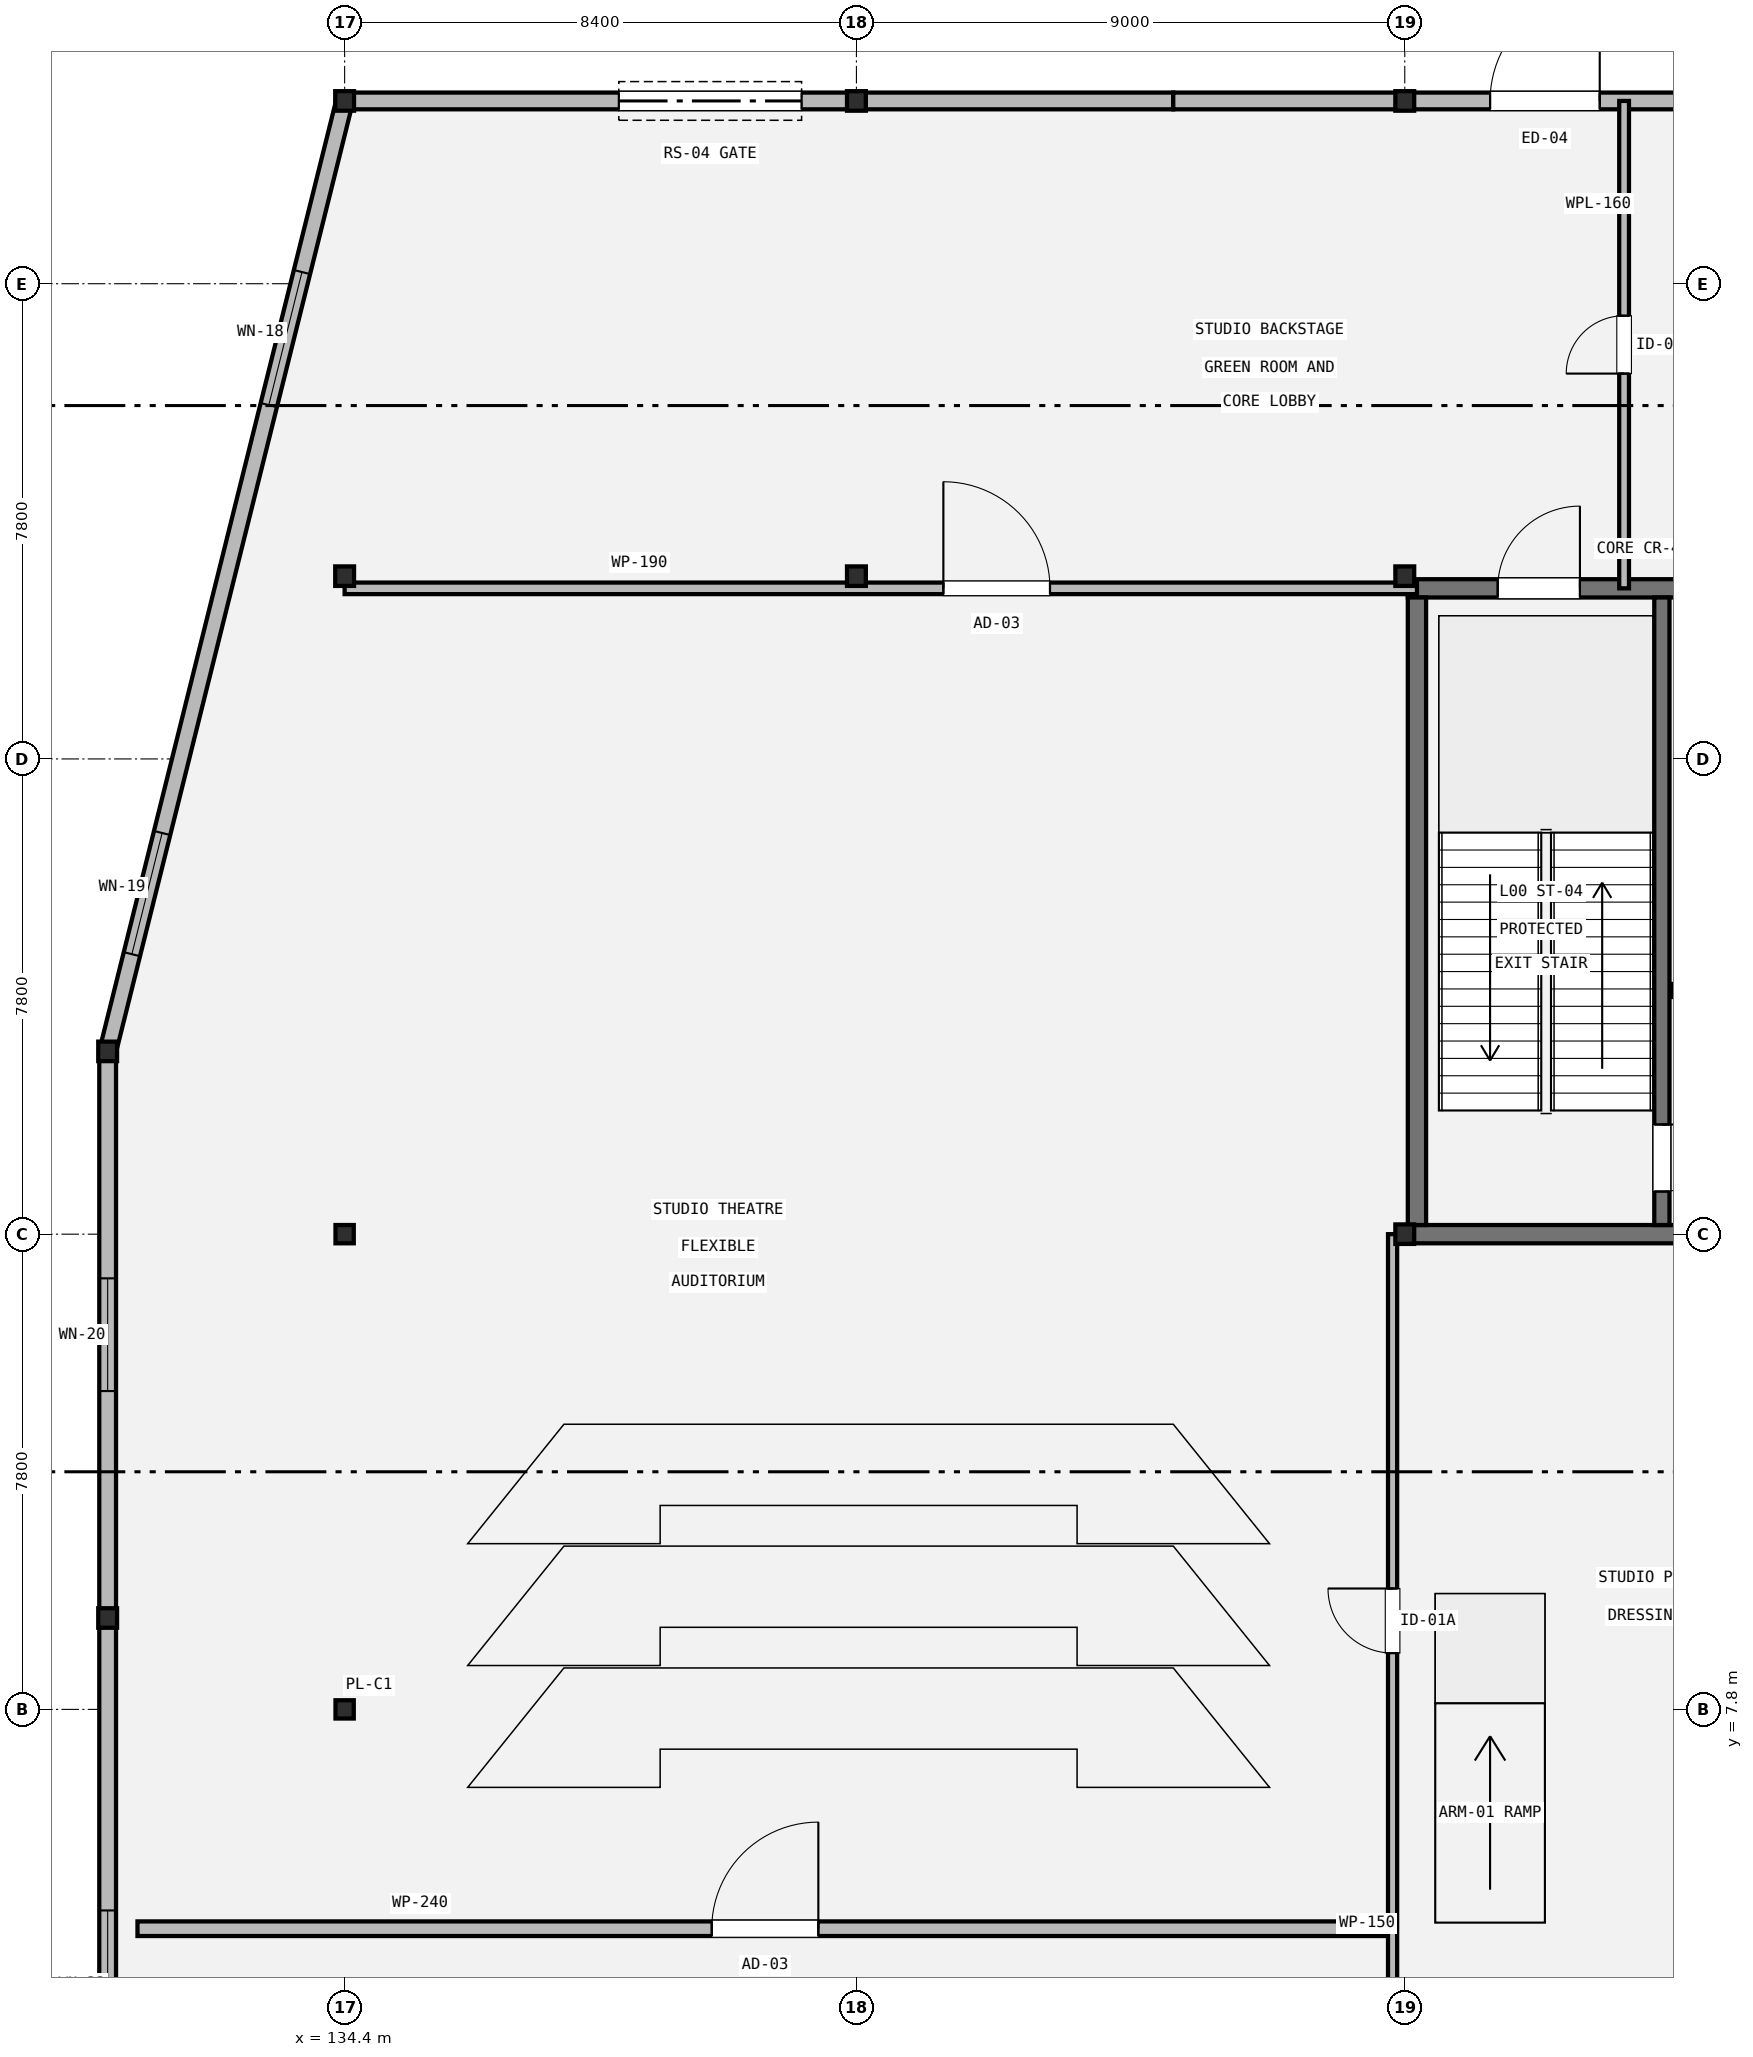
"""IFC4 building model, lengths in metres.
Left out: names, types, materials, properties, quantities, classifications, styles, units other than length and angle.
Written with IfcOpenShell. Run it as: python <this file> out.ifc"""

import sys

from ifc_helpers import new_model, si_unit, direction, frame, frame_2d, origin, origin_2d, place, context, subcontext, project, spatial, rectangle, hollow_rectangle, i_section, extrude, element, fill, save


model = new_model("IFC4")
c1 = context("Model", 3, precision=1e-05, world=origin(), true_north=direction((0.0, 1.0)))
c2 = subcontext(c1, "Body", "Model", "MODEL_VIEW")
j1 = project(units=[si_unit("LENGTHUNIT", "METRE"), si_unit("PLANEANGLEUNIT", "RADIAN")], contexts=[c1])
p1 = place(None, origin())
s1 = spatial("IfcSite", under=j1, at=p1, CompositionType="ELEMENT")
p2 = place(p1, origin())
s2 = spatial("IfcBuilding", under=s1, at=p2, CompositionType="ELEMENT")
p3 = place(p2, origin())
s3 = spatial("IfcBuildingStorey", under=s2, at=p3, CompositionType="ELEMENT", Elevation=0.0)
for number, where, z_axis, x_axis in (
    (1, (130.51, 9.3, 0.0), (0.0, 0.0, 1.0), (1.0, 0.0, 0.0)),
    (2, (130.51, 18.6, 0.0), (0.0, 0.0, 1.0), (1.0, 0.0, 0.0)),
    (3, (134.4, 26.4, 0.0), (0.0, 0.0, 1.0), (1.0, 0.0, 0.0)),
    (4, (134.4, 34.2, 0.0), (0.0, 0.0, 1.0), (1.0, 0.0, 0.0)),
    (5, (142.8, 26.4, 0.0), (0.0, 0.0, 1.0), (1.0, 0.0, 0.0)),
    (6, (142.8, 34.2, 0.0), (0.0, 0.0, 1.0), (1.0, 0.0, 0.0)),
    (7, (151.8, 15.6, 0.0), (0.0, 0.0, 1.0), (1.0, 0.0, 0.0)),
    (8, (151.8, 26.4, 0.0), (0.0, 0.0, 1.0), (1.0, 0.0, 0.0)),
    (9, (151.8, 34.2, 0.0), (0.0, 0.0, 1.0), (1.0, 0.0, 0.0)),
):
    element("IfcColumn", number, at=place(p3, frame(where, z_axis=z_axis, x_axis=x_axis)), inside=s3, PredefinedType="COLUMN", context=c2, shape_type="SweptSolid", body=[
        extrude(i_section(OverallWidth=0.309, OverallDepth=0.321, WebThickness=0.014, FlangeThickness=0.022, FilletRadius=0.015, at=origin_2d()), origin(), (0.0, 0.0, 1.0), 5.4),
    ])
for number, where, z_axis, x_axis in (
    (10, (134.4, 7.8, 0.0), (0.0, 0.0, 1.0), (1.0, 0.0, 0.0)),
    (11, (134.4, 15.6, 0.0), (0.0, 0.0, 1.0), (1.0, 0.0, 0.0)),
):
    element("IfcColumn", number, at=place(p3, frame(where, z_axis=z_axis, x_axis=x_axis)), inside=s3, PredefinedType="PILASTER", context=c2, shape_type="SweptSolid", body=[
        extrude(hollow_rectangle(XDim=0.3, YDim=0.3, WallThickness=0.016, at=origin_2d()), origin(), (0.0, 0.0, 1.0), 5.4),
    ])
p4 = place(p3, frame((130.51, 0.0, 0.0), z_axis=(0.0, 0.0, 1.0), x_axis=(0.0, 1.0, 0.0)))
e12 = element("IfcWall", 12, at=p4, inside=s3, PredefinedType="STANDARD", context=c2, shape_type="SweptSolid", body=[
    extrude(rectangle(XDim=18.6, YDim=0.275, at=frame_2d((9.3, 0.0))), origin(), (0.0, 0.0, 1.0), 4.488),
])
p5 = place(p4, frame((2.1, 0.0, 0.9)))
e13 = element("IfcOpeningElement", 13, at=p5, cuts=e12, PredefinedType="OPENING", context=c2, shape_type="SweptSolid", body=[
    extrude(rectangle(XDim=2.4, YDim=1.65, at=frame_2d((1.2, 0.825))), frame((0.0, 0.147, 0.0), z_axis=(0.0, -1.0, 0.0), x_axis=(1.0, 0.0, 0.0)), (0.0, 0.0, 1.0), 0.295),
])
p6 = place(p4, frame((13.025, 0.0, 0.9)))
e14 = element("IfcOpeningElement", 14, at=p6, cuts=e12, PredefinedType="OPENING", context=c2, shape_type="SweptSolid", body=[
    extrude(rectangle(XDim=1.85, YDim=2.1, at=frame_2d((0.925, 1.05))), frame((0.0, 0.147, 0.0), z_axis=(0.0, -1.0, 0.0), x_axis=(1.0, 0.0, 0.0)), (0.0, 0.0, 1.0), 0.295),
])
p7 = place(p3, frame((130.51, 18.6, 0.0), z_axis=(0.0, 0.0, 1.0), x_axis=(0.241917443673, 0.970296836255, 0.0)))
e15 = element("IfcWall", 15, at=p7, inside=s3, PredefinedType="STANDARD", context=c2, shape_type="SweptSolid", body=[
    extrude(rectangle(XDim=16.077, YDim=0.275, at=frame_2d((8.039, 0.0))), origin(), (0.0, 0.0, 1.0), 4.555),
])
p8 = place(p7, frame((1.644, 0.0, 0.9)))
e16 = element("IfcOpeningElement", 16, at=p8, cuts=e15, PredefinedType="OPENING", context=c2, shape_type="SweptSolid", body=[
    extrude(rectangle(XDim=2.05, YDim=2.1, at=frame_2d((1.025, 1.05))), frame((0.0, 0.147, 0.0), z_axis=(0.0, -1.0, 0.0), x_axis=(1.0, 0.0, 0.0)), (0.0, 0.0, 1.0), 0.295),
])
p9 = place(p7, frame((10.933, 0.0, 0.9)))
e17 = element("IfcOpeningElement", 17, at=p9, cuts=e15, PredefinedType="OPENING", context=c2, shape_type="SweptSolid", body=[
    extrude(rectangle(XDim=2.25, YDim=2.1, at=frame_2d((1.125, 1.05))), frame((0.0, 0.147, 0.0), z_axis=(0.0, -1.0, 0.0), x_axis=(1.0, 0.0, 0.0)), (0.0, 0.0, 1.0), 0.295),
])
p10 = place(p3, frame((134.4, 34.2, 0.0), z_axis=(0.0, 0.0, 1.0), x_axis=(1.0, 0.0, 0.0)))
e18 = element("IfcWall", 18, at=p10, inside=s3, PredefinedType="STANDARD", context=c2, shape_type="SweptSolid", body=[
    extrude(rectangle(XDim=13.6, YDim=0.275, at=frame_2d((6.8, 0.0))), origin(), (0.0, 0.0, 1.0), 4.488),
])
p11 = place(p10, frame((4.5, 0.0, 0.0)))
e19 = element("IfcOpeningElement", 19, at=p11, cuts=e18, PredefinedType="OPENING", context=c2, shape_type="SweptSolid", body=[
    extrude(rectangle(XDim=3.0, YDim=3.1, at=frame_2d((1.5, 1.55))), frame((0.0, 0.147, 0.0), z_axis=(0.0, -1.0, 0.0), x_axis=(1.0, 0.0, 0.0)), (0.0, 0.0, 1.0), 0.295),
])
p12 = place(p3, frame((148.0, 34.2, 0.0), z_axis=(0.0, 0.0, 1.0), x_axis=(1.0, 0.0, 0.0)))
e20 = element("IfcWall", 20, at=p12, inside=s3, PredefinedType="STANDARD", context=c2, shape_type="SweptSolid", body=[
    extrude(rectangle(XDim=12.8, YDim=0.275, at=frame_2d((6.4, 0.0))), origin(), (0.0, 0.0, 1.0), 4.488),
])
p13 = place(p12, frame((5.2, 0.0, 0.0)))
e21 = element("IfcOpeningElement", 21, at=p13, cuts=e20, PredefinedType="OPENING", context=c2, shape_type="SweptSolid", body=[
    extrude(rectangle(XDim=1.8, YDim=2.4, at=frame_2d((0.9, 1.2))), frame((0.0, 0.147, 0.0), z_axis=(0.0, -1.0, 0.0), x_axis=(1.0, 0.0, 0.0)), (0.0, 0.0, 1.0), 0.295),
])
p14 = place(p3, frame((160.8, 15.6, 0.0), z_axis=(0.0, 0.0, 1.0), x_axis=(-1.0, 0.0, 0.0)))
e22 = element("IfcWall", 22, at=p14, inside=s3, PredefinedType="SHEAR", context=c2, shape_type="SweptSolid", body=[
    extrude(rectangle(XDim=8.95, YDim=0.3, at=frame_2d((4.475, 0.0))), origin(), (0.0, 0.0, 1.0), 5.18),
])
p15 = place(p3, frame((151.85, 26.2, 0.0), z_axis=(0.0, 0.0, 1.0), x_axis=(1.0, 0.0, 0.0)))
e23 = element("IfcWall", 23, at=p15, inside=s3, PredefinedType="SHEAR", context=c2, shape_type="SweptSolid", body=[
    extrude(rectangle(XDim=8.95, YDim=0.3, at=frame_2d((4.475, 0.0))), origin(), (0.0, 0.0, 1.0), 5.18),
])
p16 = place(p15, frame((1.475, 0.0, 0.0)))
e24 = element("IfcOpeningElement", 24, at=p16, cuts=e23, PredefinedType="OPENING", context=c2, shape_type="SweptSolid", body=[
    extrude(rectangle(XDim=1.35, YDim=2.15, at=frame_2d((0.675, 1.075))), frame((0.0, 0.16, 0.0), z_axis=(0.0, -1.0, 0.0), x_axis=(1.0, 0.0, 0.0)), (0.0, 0.0, 1.0), 0.32),
])
p17 = place(p3, frame((152.0, 15.75, 0.0), z_axis=(0.0, 0.0, 1.0), x_axis=(0.0, 1.0, 0.0)))
e25 = element("IfcWall", 25, at=p17, inside=s3, PredefinedType="SHEAR", context=c2, shape_type="SweptSolid", body=[
    extrude(rectangle(XDim=10.3, YDim=0.3, at=frame_2d((5.15, 0.0))), origin(), (0.0, 0.0, 1.0), 5.18),
])
p18 = place(p3, frame((156.02, 26.05, 0.0), z_axis=(0.0, 0.0, 1.0), x_axis=(0.0, -1.0, 0.0)))
e26 = element("IfcWall", 26, at=p18, inside=s3, PredefinedType="SHEAR", context=c2, shape_type="SweptSolid", body=[
    extrude(rectangle(XDim=10.3, YDim=0.25, at=frame_2d((5.15, 0.0))), origin(), (0.0, 0.0, 1.0), 5.18),
])
p19 = place(p18, frame((8.65, 0.0, 0.0)))
e27 = element("IfcOpeningElement", 27, at=p19, cuts=e26, PredefinedType="OPENING", context=c2, shape_type="SweptSolid", body=[
    extrude(rectangle(XDim=1.1, YDim=2.15, at=frame_2d((0.55, 1.075))), frame((0.0, 0.135, 0.0), z_axis=(0.0, -1.0, 0.0), x_axis=(1.0, 0.0, 0.0)), (0.0, 0.0, 1.0), 0.27),
])
p20 = place(p3, frame((156.18, 19.6, 0.0), z_axis=(0.0, 0.0, 1.0), x_axis=(1.0, 0.0, 0.0)))
e28 = element("IfcWall", 28, at=p20, inside=s3, PredefinedType="STANDARD", context=c2, shape_type="SweptSolid", body=[
    extrude(rectangle(XDim=4.3, YDim=0.215, at=frame_2d((2.15, 0.0))), origin(), (0.0, 0.0, 1.0), 5.172),
])
p21 = place(p20, frame((1.625, 0.0, 0.0)))
e29 = element("IfcOpeningElement", 29, at=p21, cuts=e28, PredefinedType="OPENING", context=c2, shape_type="SweptSolid", body=[
    extrude(rectangle(XDim=1.05, YDim=2.15, at=frame_2d((0.525, 1.075))), frame((0.0, 0.117, 0.0), z_axis=(0.0, -1.0, 0.0), x_axis=(1.0, 0.0, 0.0)), (0.0, 0.0, 1.0), 0.235),
])
p22 = place(p3, frame((131.0, 4.2, 0.0), z_axis=(0.0, 0.0, 1.0), x_axis=(1.0, 0.0, 0.0)))
e30 = element("IfcWall", 30, at=p22, inside=s3, PredefinedType="PARTITIONING", context=c2, shape_type="SweptSolid", body=[
    extrude(rectangle(XDim=20.6, YDim=0.24, at=frame_2d((10.3, 0.0))), origin(), (0.0, 0.0, 1.0), 4.402),
])
p23 = place(p22, frame((9.425, 0.0, 0.0)))
e31 = element("IfcOpeningElement", 31, at=p23, cuts=e30, PredefinedType="OPENING", context=c2, shape_type="SweptSolid", body=[
    extrude(rectangle(XDim=1.75, YDim=2.3, at=frame_2d((0.875, 1.15))), frame((0.0, 0.13, 0.0), z_axis=(0.0, -1.0, 0.0), x_axis=(1.0, 0.0, 0.0)), (0.0, 0.0, 1.0), 0.26),
])
p24 = place(p3, frame((134.4, 26.2, 0.0), z_axis=(0.0, 0.0, 1.0), x_axis=(1.0, 0.0, 0.0)))
e32 = element("IfcWall", 32, at=p24, inside=s3, PredefinedType="PARTITIONING", context=c2, shape_type="SweptSolid", body=[
    extrude(rectangle(XDim=17.6, YDim=0.19, at=frame_2d((8.8, 0.0))), origin(), (0.0, 0.0, 1.0), 4.488),
])
p25 = place(p24, frame((9.827, 0.0, 0.0)))
e33 = element("IfcOpeningElement", 33, at=p25, cuts=e32, PredefinedType="OPENING", context=c2, shape_type="SweptSolid", body=[
    extrude(rectangle(XDim=1.75, YDim=2.3, at=frame_2d((0.875, 1.15))), frame((0.0, 0.105, 0.0), z_axis=(0.0, -1.0, 0.0), x_axis=(1.0, 0.0, 0.0)), (0.0, 0.0, 1.0), 0.21),
])
p26 = place(p3, frame((151.6, 0.0, 0.0), z_axis=(0.0, 0.0, 1.0), x_axis=(0.0, 1.0, 0.0)))
e34 = element("IfcWall", 34, at=p26, inside=s3, PredefinedType="PARTITIONING", context=c2, shape_type="SweptSolid", body=[
    extrude(rectangle(XDim=15.6, YDim=0.15, at=frame_2d((7.8, 0.0))), origin(), (0.0, 0.0, 1.0), 4.402),
])
p27 = place(p26, frame((8.724, 0.0, 0.0)))
e35 = element("IfcOpeningElement", 35, at=p27, cuts=e34, PredefinedType="OPENING", context=c2, shape_type="SweptSolid", body=[
    extrude(rectangle(XDim=1.06, YDim=2.1, at=frame_2d((0.53, 1.05))), frame((0.0, 0.085, 0.0), z_axis=(0.0, -1.0, 0.0), x_axis=(1.0, 0.0, 0.0)), (0.0, 0.0, 1.0), 0.17),
])
p28 = place(p3, frame((155.4, 26.2, 0.0), z_axis=(0.0, 0.0, 1.0), x_axis=(0.0, 1.0, 0.0)))
e36 = element("IfcWall", 36, at=p28, inside=s3, PredefinedType="PLUMBINGWALL", context=c2, shape_type="SweptSolid", body=[
    extrude(rectangle(XDim=8.0, YDim=0.16, at=frame_2d((4.0, 0.0))), origin(), (0.0, 0.0, 1.0), 4.488),
])
p29 = place(p28, frame((3.525, 0.0, 0.0)))
e37 = element("IfcOpeningElement", 37, at=p29, cuts=e36, PredefinedType="OPENING", context=c2, shape_type="SweptSolid", body=[
    extrude(rectangle(XDim=0.95, YDim=2.1, at=frame_2d((0.475, 1.05))), frame((0.0, 0.09, 0.0), z_axis=(0.0, -1.0, 0.0), x_axis=(1.0, 0.0, 0.0)), (0.0, 0.0, 1.0), 0.18),
])
p30 = place(p5, origin())
e38 = element("IfcWindow", 38, at=p30, inside=s3, PartitioningType="SINGLE_PANEL", PredefinedType="WINDOW", context=c2, shape_type="SweptSolid", body=[
    extrude(rectangle(XDim=2.4, YDim=1.65, at=frame_2d((1.2, 0.825))), frame((0.0, 0.03, 0.0), z_axis=(0.0, -1.0, 0.0), x_axis=(1.0, 0.0, 0.0)), (0.0, 0.0, 1.0), 0.06),
])
fill(e13, e38)
p31 = place(p6, origin())
e39 = element("IfcWindow", 39, at=p31, inside=s3, PartitioningType="SINGLE_PANEL", PredefinedType="WINDOW", context=c2, shape_type="SweptSolid", body=[
    extrude(rectangle(XDim=1.85, YDim=2.1, at=frame_2d((0.925, 1.05))), frame((0.0, 0.03, 0.0), z_axis=(0.0, -1.0, 0.0), x_axis=(1.0, 0.0, 0.0)), (0.0, 0.0, 1.0), 0.06),
])
fill(e14, e39)
p32 = place(p8, origin())
e40 = element("IfcWindow", 40, at=p32, inside=s3, PartitioningType="SINGLE_PANEL", PredefinedType="WINDOW", context=c2, shape_type="SweptSolid", body=[
    extrude(rectangle(XDim=2.05, YDim=2.1, at=frame_2d((1.025, 1.05))), frame((0.0, 0.03, 0.0), z_axis=(0.0, -1.0, 0.0), x_axis=(1.0, 0.0, 0.0)), (0.0, 0.0, 1.0), 0.06),
])
fill(e16, e40)
p33 = place(p9, origin())
e41 = element("IfcWindow", 41, at=p33, inside=s3, PartitioningType="SINGLE_PANEL", PredefinedType="WINDOW", context=c2, shape_type="SweptSolid", body=[
    extrude(rectangle(XDim=2.25, YDim=2.1, at=frame_2d((1.125, 1.05))), frame((0.0, 0.03, 0.0), z_axis=(0.0, -1.0, 0.0), x_axis=(1.0, 0.0, 0.0)), (0.0, 0.0, 1.0), 0.06),
])
fill(e17, e41)
p34 = place(p11, origin())
e42 = element("IfcDoor", 42, at=p34, inside=s3, OperationType="ROLLINGUP", PredefinedType="GATE", context=c2, shape_type="SweptSolid", body=[
    extrude(rectangle(XDim=3.0, YDim=3.1, at=frame_2d((1.5, 1.55))), frame((0.0, 0.025, 0.0), z_axis=(0.0, -1.0, 0.0), x_axis=(1.0, 0.0, 0.0)), (0.0, 0.0, 1.0), 0.05),
])
fill(e19, e42)
p35 = place(p13, origin())
e43 = element("IfcDoor", 43, at=p35, inside=s3, OperationType="SINGLE_SWING_RIGHT", PredefinedType="DOOR", context=c2, shape_type="SweptSolid", body=[
    extrude(rectangle(XDim=1.8, YDim=2.4, at=frame_2d((0.9, 1.2))), frame((0.0, 0.025, 0.0), z_axis=(0.0, -1.0, 0.0), x_axis=(1.0, 0.0, 0.0)), (0.0, 0.0, 1.0), 0.05),
])
fill(e21, e43)
p36 = place(p19, origin())
e44 = element("IfcDoor", 44, at=p36, inside=s3, OperationType="SINGLE_SWING_LEFT", PredefinedType="DOOR", context=c2, shape_type="SweptSolid", body=[
    extrude(rectangle(XDim=1.1, YDim=2.15, at=frame_2d((0.55, 1.075))), frame((0.0, 0.025, 0.0), z_axis=(0.0, -1.0, 0.0), x_axis=(1.0, 0.0, 0.0)), (0.0, 0.0, 1.0), 0.05),
])
fill(e27, e44)
p37 = place(p16, origin())
e45 = element("IfcDoor", 45, at=p37, inside=s3, OperationType="SINGLE_SWING_RIGHT", PredefinedType="DOOR", context=c2, shape_type="SweptSolid", body=[
    extrude(rectangle(XDim=1.35, YDim=2.15, at=frame_2d((0.675, 1.075))), frame((0.0, 0.025, 0.0), z_axis=(0.0, -1.0, 0.0), x_axis=(1.0, 0.0, 0.0)), (0.0, 0.0, 1.0), 0.05),
])
fill(e24, e45)
p38 = place(p23, origin())
e46 = element("IfcDoor", 46, at=p38, inside=s3, OperationType="SINGLE_SWING_RIGHT", PredefinedType="DOOR", context=c2, shape_type="SweptSolid", body=[
    extrude(rectangle(XDim=1.75, YDim=2.3, at=frame_2d((0.875, 1.15))), frame((0.0, 0.025, 0.0), z_axis=(0.0, -1.0, 0.0), x_axis=(1.0, 0.0, 0.0)), (0.0, 0.0, 1.0), 0.05),
])
fill(e31, e46)
p39 = place(p25, origin())
e47 = element("IfcDoor", 47, at=p39, inside=s3, OperationType="SINGLE_SWING_LEFT", PredefinedType="DOOR", context=c2, shape_type="SweptSolid", body=[
    extrude(rectangle(XDim=1.75, YDim=2.3, at=frame_2d((0.875, 1.15))), frame((0.0, 0.025, 0.0), z_axis=(0.0, -1.0, 0.0), x_axis=(1.0, 0.0, 0.0)), (0.0, 0.0, 1.0), 0.05),
])
fill(e33, e47)
p40 = place(p27, origin())
e48 = element("IfcDoor", 48, at=p40, inside=s3, OperationType="SINGLE_SWING_RIGHT", PredefinedType="DOOR", context=c2, shape_type="SweptSolid", body=[
    extrude(rectangle(XDim=1.06, YDim=2.1, at=frame_2d((0.53, 1.05))), frame((0.0, 0.025, 0.0), z_axis=(0.0, -1.0, 0.0), x_axis=(1.0, 0.0, 0.0)), (0.0, 0.0, 1.0), 0.05),
])
fill(e35, e48)
p41 = place(p29, origin())
e49 = element("IfcDoor", 49, at=p41, inside=s3, OperationType="SINGLE_SWING_LEFT", PredefinedType="DOOR", context=c2, shape_type="SweptSolid", body=[
    extrude(rectangle(XDim=0.95, YDim=2.1, at=frame_2d((0.475, 1.05))), frame((0.0, 0.025, 0.0), z_axis=(0.0, -1.0, 0.0), x_axis=(1.0, 0.0, 0.0)), (0.0, 0.0, 1.0), 0.05),
])
fill(e37, e49)
save(model, sys.argv[1])
